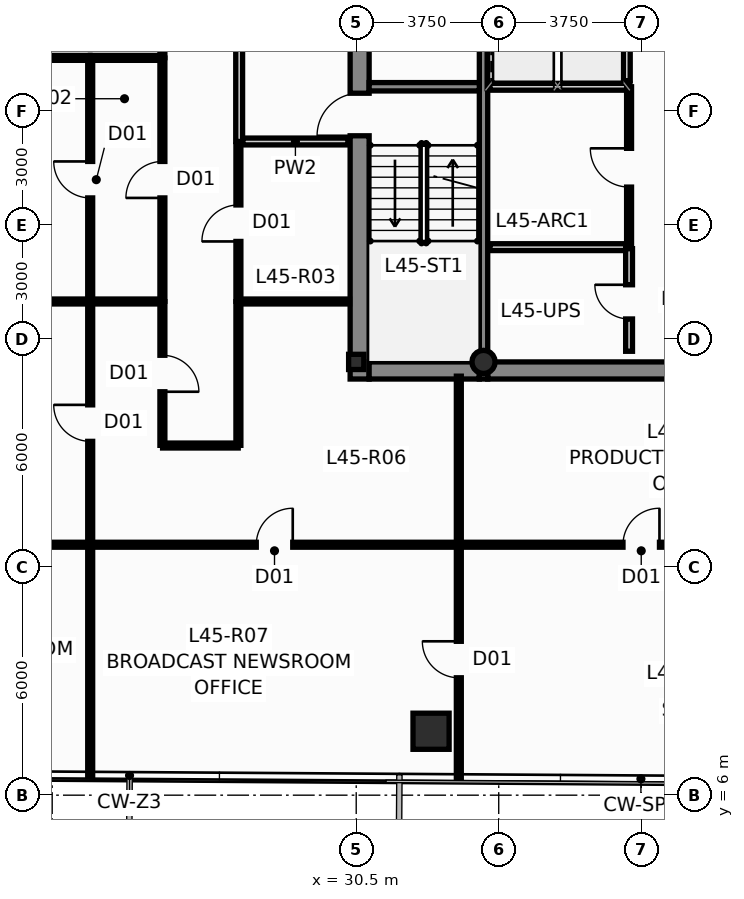
"""IFC4 building model, lengths in metres.
Left out: names, types, materials, properties, quantities, classifications, styles, units other than length and angle.
Written with IfcOpenShell. Run it as: python <this file> out.ifc"""

import sys

from ifc_helpers import new_model, si_unit, direction, frame, frame_2d, origin, origin_2d, place, context, subcontext, project, spatial, rectangle, hollow_rectangle, hollow_circle, i_section, extrude, source, transform, mapped, element, fill, save


model = new_model("IFC4")
c1 = context("Model", 3, precision=1e-05, world=origin(), true_north=direction((0.0, 1.0)))
c2 = subcontext(c1, "Body", "Model", "MODEL_VIEW")
j1 = project(units=[si_unit("LENGTHUNIT", "METRE"), si_unit("PLANEANGLEUNIT", "RADIAN")], contexts=[c1])
p1 = place(None, origin())
s1 = spatial("IfcSite", under=j1, at=p1, CompositionType="ELEMENT")
p2 = place(p1, origin())
s2 = spatial("IfcBuilding", under=s1, at=p2, CompositionType="ELEMENT")
p3 = place(p2, frame((0.0, 0.0, 173.1)))
s3 = spatial("IfcBuildingStorey", under=s2, at=p3, CompositionType="ELEMENT", Elevation=173.1)
m1 = source(origin(), c2, "Body", "SweptSolid", [
    extrude(i_section(OverallWidth=0.4, OverallDepth=0.4, WebThickness=0.02, FlangeThickness=0.032, at=origin_2d()), origin(), (0.0, 0.0, 1.0), 3.65),
])
p4 = place(p3, frame((30.5, 17.4, 0.0), z_axis=(0.0, 0.0, 1.0), x_axis=(1.0, 0.0, 0.0)))
e1 = element("IfcColumn", 1, at=p4, inside=s3, PredefinedType="COLUMN", context=c2, shape_type="MappedRepresentation", body=[
    mapped(m1, transform((0.0, 0.0, 0.0), scale=1.0)),
])
m2 = source(origin(), c2, "Body", "SweptSolid", [
    extrude(hollow_circle(Radius=0.305, WallThickness=0.025, at=origin_2d()), origin(), (0.0, 0.0, 1.0), 3.65),
])
p5 = place(p3, frame((33.85, 17.4, 0.0), z_axis=(0.0, 0.0, 1.0), x_axis=(1.0, 0.0, 0.0)))
e2 = element("IfcColumn", 2, at=p5, inside=s3, PredefinedType="COLUMN", context=c2, shape_type="MappedRepresentation", body=[
    mapped(m2, transform((0.0, 0.0, 0.0), scale=1.0)),
])
p6 = place(p3, frame((30.59, 16.95, 0.0), z_axis=(0.0, 0.0, 1.0), x_axis=(0.0, 1.0, 0.0)))
e3 = element("IfcWall", 3, at=p6, inside=s3, PredefinedType="SHEAR", context=c2, shape_type="SweptSolid", body=[
    extrude(rectangle(XDim=13.275, YDim=0.5, at=frame_2d((6.638, 0.0))), origin(), (0.0, 0.0, 1.0), 3.65),
])
p7 = place(p6, frame((6.4, 0.0, 0.0)))
e4 = element("IfcOpeningElement", 4, at=p7, cuts=e3, PredefinedType="OPENING", context=c2, shape_type="SweptSolid", body=[
    extrude(rectangle(XDim=1.12, YDim=2.15, at=frame_2d((0.56, 1.075))), frame((0.0, 0.262, 0.0), z_axis=(0.0, -1.0, 0.0), x_axis=(1.0, 0.0, 0.0)), (0.0, 0.0, 1.0), 0.524),
])
p8 = place(p6, frame((10.85, 0.0, 0.0)))
e5 = element("IfcOpeningElement", 5, at=p8, cuts=e3, PredefinedType="OPENING", context=c2, shape_type="SweptSolid", body=[
    extrude(rectangle(XDim=1.2, YDim=2.2, at=frame_2d((0.6, 1.1))), frame((0.0, 0.262, 0.0), z_axis=(0.0, -1.0, 0.0), x_axis=(1.0, 0.0, 0.0)), (0.0, 0.0, 1.0), 0.524),
])
p9 = place(p3, frame((30.84, 17.175, 0.0), z_axis=(0.0, 0.0, 1.0), x_axis=(1.0, 0.0, 0.0)))
e6 = element("IfcWall", 6, at=p9, inside=s3, PredefinedType="SHEAR", context=c2, shape_type="SweptSolid", body=[
    extrude(rectangle(XDim=2.9, YDim=0.45, at=frame_2d((1.45, 0.0))), origin(), (0.0, 0.0, 1.0), 3.65),
])
p10 = place(p3, frame((33.96, 17.175, 0.0), z_axis=(0.0, 0.0, 1.0), x_axis=(1.0, 0.0, 0.0)))
e7 = element("IfcWall", 7, at=p10, inside=s3, PredefinedType="SHEAR", context=c2, shape_type="SweptSolid", body=[
    extrude(rectangle(XDim=8.08, YDim=0.45, at=frame_2d((4.04, 0.0))), origin(), (0.0, 0.0, 1.0), 3.65),
])
p11 = place(p3, frame((33.85, 16.95, 0.0), z_axis=(0.0, 0.0, 1.0), x_axis=(0.0, 1.0, 0.0)))
e8 = element("IfcWall", 8, at=p11, inside=s3, PredefinedType="SHEAR", context=c2, shape_type="SweptSolid", body=[
    extrude(rectangle(XDim=13.275, YDim=0.22, at=frame_2d((6.638, 0.0))), origin(), (0.0, 0.0, 1.0), 3.65),
])
p12 = place(p3, frame((30.84, 24.64, 0.0), z_axis=(0.0, 0.0, 1.0), x_axis=(1.0, 0.0, 0.0)))
e9 = element("IfcWall", 9, at=p12, inside=s3, PredefinedType="SHEAR", context=c2, shape_type="SweptSolid", body=[
    extrude(rectangle(XDim=2.9, YDim=0.22, at=frame_2d((1.45, 0.0))), origin(), (0.0, 0.0, 1.0), 3.65),
])
m3 = source(origin(), c2, "Body", "SweptSolid", [
    extrude(hollow_rectangle(XDim=0.95, YDim=0.95, WallThickness=0.05, at=origin_2d()), origin(), (0.0, 0.0, 1.0), 3.651),
])
p13 = place(p3, frame((32.469, 7.682, 0.0), z_axis=(-0.004480676264, 0.019862102244, 0.999792688728), x_axis=(-0.975486508487, -0.220059246022, 0.0)))
e10 = element("IfcColumn", 10, at=p13, inside=s3, PredefinedType="COLUMN", context=c2, shape_type="MappedRepresentation", body=[
    mapped(m3, transform((0.0, 0.0, 0.0), scale=1.0)),
])
p14 = place(p3, frame((37.62, 24.8, 0.0), z_axis=(0.0, 0.0, 1.0), x_axis=(0.0, 1.0, 0.0)))
e11 = element("IfcWall", 11, at=p14, inside=s3, PredefinedType="PARTITIONING", context=c2, shape_type="SweptSolid", body=[
    extrude(rectangle(XDim=2.0, YDim=0.18, at=frame_2d((1.0, 0.0))), origin(), (0.0, 0.0, 1.0), 3.4),
])
p15 = place(p3, frame((34.02, 24.64, 0.0), z_axis=(0.0, 0.0, 1.0), x_axis=(1.0, 0.0, 0.0)))
e12 = element("IfcWall", 12, at=p15, inside=s3, PredefinedType="PARTITIONING", context=c2, shape_type="SweptSolid", body=[
    extrude(rectangle(XDim=3.68, YDim=0.18, at=frame_2d((1.84, 0.0))), origin(), (0.0, 0.0, 1.0), 3.4),
])
p16 = place(p3, frame((27.42, 23.2, 0.0), z_axis=(0.0, 0.0, 1.0), x_axis=(0.0, 1.0, 0.0)))
e13 = element("IfcWall", 13, at=p16, inside=s3, PredefinedType="PARTITIONING", context=c2, shape_type="SweptSolid", body=[
    extrude(rectangle(XDim=6.4, YDim=0.18, at=frame_2d((3.2, 0.0))), origin(), (0.0, 0.0, 1.0), 3.078),
])
p17 = place(p16, frame((2.65, 0.0, 0.0)))
e14 = element("IfcOpeningElement", 14, at=p17, cuts=e13, PredefinedType="OPENING", context=c2, shape_type="SweptSolid", body=[
    extrude(rectangle(XDim=1.05, YDim=2.15, at=frame_2d((0.525, 1.075))), frame((0.0, 0.102, 0.0), z_axis=(0.0, -1.0, 0.0), x_axis=(1.0, 0.0, 0.0)), (0.0, 0.0, 1.0), 0.204),
])
p18 = place(p3, frame((27.52, 23.2, 0.0), z_axis=(0.0, 0.0, 1.0), x_axis=(1.0, 0.0, 0.0)))
e15 = element("IfcWall", 15, at=p18, inside=s3, PredefinedType="PARTITIONING", context=c2, shape_type="SweptSolid", body=[
    extrude(rectangle(XDim=2.76, YDim=0.18, at=frame_2d((1.38, 0.0))), origin(), (0.0, 0.0, 1.0), 3.4),
])
p19 = place(p3, frame((34.02, 20.42, 0.0), z_axis=(0.0, 0.0, 1.0), x_axis=(1.0, 0.0, 0.0)))
e16 = element("IfcWall", 16, at=p19, inside=s3, PredefinedType="PARTITIONING", context=c2, shape_type="SweptSolid", body=[
    extrude(rectangle(XDim=3.64, YDim=0.18, at=frame_2d((1.82, 0.0))), origin(), (0.0, 0.0, 1.0), 3.4),
])
p20 = place(p3, frame((37.68, 20.5, 0.0), z_axis=(0.0, 0.0, 1.0), x_axis=(0.0, 1.0, 0.0)))
e17 = element("IfcWall", 17, at=p20, inside=s3, PredefinedType="PARTITIONING", context=c2, shape_type="SweptSolid", body=[
    extrude(rectangle(XDim=4.14, YDim=0.13, at=frame_2d((2.07, 0.0))), origin(), (0.0, 0.0, 1.0), 3.4),
])
p21 = place(p20, frame((1.5, 0.0, 0.0)))
e18 = element("IfcOpeningElement", 18, at=p21, cuts=e17, PredefinedType="OPENING", context=c2, shape_type="SweptSolid", body=[
    extrude(rectangle(XDim=1.02, YDim=2.15, at=frame_2d((0.51, 1.075))), frame((0.0, 0.077, 0.0), z_axis=(0.0, -1.0, 0.0), x_axis=(1.0, 0.0, 0.0)), (0.0, 0.0, 1.0), 0.154),
])
p22 = place(p3, frame((37.68, 17.68, 0.0), z_axis=(0.0, 0.0, 1.0), x_axis=(0.0, 1.0, 0.0)))
e19 = element("IfcWall", 19, at=p22, inside=s3, PredefinedType="PARTITIONING", context=c2, shape_type="SweptSolid", body=[
    extrude(rectangle(XDim=2.7, YDim=0.18, at=frame_2d((1.35, 0.0))), origin(), (0.0, 0.0, 1.0), 3.4),
])
p23 = place(p22, frame((0.85, 0.0, 0.0)))
e20 = element("IfcOpeningElement", 20, at=p23, cuts=e19, PredefinedType="OPENING", context=c2, shape_type="SweptSolid", body=[
    extrude(rectangle(XDim=0.9, YDim=2.1, at=frame_2d((0.45, 1.05))), frame((0.0, 0.102, 0.0), z_axis=(0.0, -1.0, 0.0), x_axis=(1.0, 0.0, 0.0)), (0.0, 0.0, 1.0), 0.204),
])
p24 = place(p3, frame((13.827, 12.59, 0.0), z_axis=(0.0, 0.0, 1.0), x_axis=(1.0, 0.0, 0.0)))
e21 = element("IfcWall", 21, at=p24, inside=s3, PredefinedType="PARTITIONING", context=c2, shape_type="SweptSolid", body=[
    extrude(rectangle(XDim=9.668, YDim=0.13, at=frame_2d((4.834, 0.0))), origin(), (0.0, 0.0, 1.0), 3.4),
])
p25 = place(p24, frame((4.408, 0.0, 0.0)))
e22 = element("IfcOpeningElement", 22, at=p25, cuts=e21, PredefinedType="OPENING", context=c2, shape_type="SweptSolid", body=[
    extrude(rectangle(XDim=0.96, YDim=2.15, at=frame_2d((0.48, 1.075))), frame((0.0, 0.077, 0.0), z_axis=(0.0, -1.0, 0.0), x_axis=(1.0, 0.0, 0.0)), (0.0, 0.0, 1.0), 0.154),
])
p26 = place(p3, frame((23.505, 12.59, 0.0), z_axis=(0.0, 0.0, 1.0), x_axis=(1.0, 0.0, 0.0)))
e23 = element("IfcWall", 23, at=p26, inside=s3, PredefinedType="PARTITIONING", context=c2, shape_type="SweptSolid", body=[
    extrude(rectangle(XDim=9.69, YDim=0.13, at=frame_2d((4.845, 0.0))), origin(), (0.0, 0.0, 1.0), 3.4),
])
p27 = place(p26, frame((4.365, 0.0, 0.0)))
e24 = element("IfcOpeningElement", 24, at=p27, cuts=e23, PredefinedType="OPENING", context=c2, shape_type="SweptSolid", body=[
    extrude(rectangle(XDim=0.96, YDim=2.15, at=frame_2d((0.48, 1.075))), frame((0.0, 0.077, 0.0), z_axis=(0.0, -1.0, 0.0), x_axis=(1.0, 0.0, 0.0)), (0.0, 0.0, 1.0), 0.154),
])
p28 = place(p3, frame((33.205, 12.59, 0.0), z_axis=(0.0, 0.0, 1.0), x_axis=(1.0, 0.0, 0.0)))
e25 = element("IfcWall", 25, at=p28, inside=s3, PredefinedType="PARTITIONING", context=c2, shape_type="SweptSolid", body=[
    extrude(rectangle(XDim=9.59, YDim=0.13, at=frame_2d((4.795, 0.0))), origin(), (0.0, 0.0, 1.0), 3.4),
])
p29 = place(p28, frame((4.315, 0.0, 0.0)))
e26 = element("IfcOpeningElement", 26, at=p29, cuts=e25, PredefinedType="OPENING", context=c2, shape_type="SweptSolid", body=[
    extrude(rectangle(XDim=0.96, YDim=2.15, at=frame_2d((0.48, 1.075))), frame((0.0, 0.077, 0.0), z_axis=(0.0, -1.0, 0.0), x_axis=(1.0, 0.0, 0.0)), (0.0, 0.0, 1.0), 0.154),
])
p30 = place(p3, frame((15.201, 18.99, 0.0), z_axis=(0.0, 0.0, 1.0), x_axis=(1.0, 0.0, 0.0)))
e27 = element("IfcWall", 27, at=p30, inside=s3, PredefinedType="PARTITIONING", context=c2, shape_type="SweptSolid", body=[
    extrude(rectangle(XDim=8.294, YDim=0.13, at=frame_2d((4.147, 0.0))), origin(), (0.0, 0.0, 1.0), 3.4),
])
p31 = place(p3, frame((25.4, 18.995, 0.0), z_axis=(0.0, 0.0, 1.0), x_axis=(0.0, 1.0, 0.0)))
e28 = element("IfcWall", 28, at=p31, inside=s3, PredefinedType="PARTITIONING", context=c2, shape_type="SweptSolid", body=[
    extrude(rectangle(XDim=6.4, YDim=0.13, at=frame_2d((3.2, 0.0))), origin(), (0.0, 0.0, 1.0), 3.078),
])
p32 = place(p31, frame((2.72, 0.0, 0.0)))
e29 = element("IfcOpeningElement", 29, at=p32, cuts=e28, PredefinedType="OPENING", context=c2, shape_type="SweptSolid", body=[
    extrude(rectangle(XDim=0.96, YDim=2.15, at=frame_2d((0.48, 1.075))), frame((0.0, 0.077, 0.0), z_axis=(0.0, -1.0, 0.0), x_axis=(1.0, 0.0, 0.0)), (0.0, 0.0, 1.0), 0.154),
])
p33 = place(p3, frame((23.5, 18.995, 0.0), z_axis=(0.0, 0.0, 1.0), x_axis=(0.0, 1.0, 0.0)))
e30 = element("IfcWall", 30, at=p33, inside=s3, PredefinedType="PARTITIONING", context=c2, shape_type="SweptSolid", body=[
    extrude(rectangle(XDim=6.4, YDim=0.13, at=frame_2d((3.2, 0.0))), origin(), (0.0, 0.0, 1.0), 3.078),
])
p34 = place(p33, frame((2.72, 0.0, 0.0)))
e31 = element("IfcOpeningElement", 31, at=p34, cuts=e30, PredefinedType="OPENING", context=c2, shape_type="SweptSolid", body=[
    extrude(rectangle(XDim=0.96, YDim=2.15, at=frame_2d((0.48, 1.075))), frame((0.0, 0.077, 0.0), z_axis=(0.0, -1.0, 0.0), x_axis=(1.0, 0.0, 0.0)), (0.0, 0.0, 1.0), 0.154),
])
p35 = place(p3, frame((23.5, 12.595, 0.0), z_axis=(0.0, 0.0, 1.0), x_axis=(0.0, 1.0, 0.0)))
e32 = element("IfcWall", 32, at=p35, inside=s3, PredefinedType="PARTITIONING", context=c2, shape_type="SweptSolid", body=[
    extrude(rectangle(XDim=6.39, YDim=0.13, at=frame_2d((3.195, 0.0))), origin(), (0.0, 0.0, 1.0), 3.4),
])
p36 = place(p35, frame((2.715, 0.0, 0.0)))
e33 = element("IfcOpeningElement", 33, at=p36, cuts=e32, PredefinedType="OPENING", context=c2, shape_type="SweptSolid", body=[
    extrude(rectangle(XDim=0.96, YDim=2.15, at=frame_2d((0.48, 1.075))), frame((0.0, 0.077, 0.0), z_axis=(0.0, -1.0, 0.0), x_axis=(1.0, 0.0, 0.0)), (0.0, 0.0, 1.0), 0.154),
])
p37 = place(p3, frame((33.2, 6.456, 0.0), z_axis=(0.0, 0.0, 1.0), x_axis=(0.0, 1.0, 0.0)))
e34 = element("IfcWall", 34, at=p37, inside=s3, PredefinedType="PARTITIONING", context=c2, shape_type="SweptSolid", body=[
    extrude(rectangle(XDim=6.129, YDim=0.13, at=frame_2d((3.064, 0.0))), origin(), (0.0, 0.0, 1.0), 3.4),
])
p38 = place(p37, frame((2.633, 0.0, 0.0)))
e35 = element("IfcOpeningElement", 35, at=p38, cuts=e34, PredefinedType="OPENING", context=c2, shape_type="SweptSolid", body=[
    extrude(rectangle(XDim=0.96, YDim=2.15, at=frame_2d((0.48, 1.075))), frame((0.0, 0.077, 0.0), z_axis=(0.0, -1.0, 0.0), x_axis=(1.0, 0.0, 0.0)), (0.0, 0.0, 1.0), 0.154),
])
p39 = place(p3, frame((23.5, 6.52, 0.0), z_axis=(0.0, 0.0, 1.0), x_axis=(0.0, 1.0, 0.0)))
e36 = element("IfcWall", 36, at=p39, inside=s3, PredefinedType="PARTITIONING", context=c2, shape_type="SweptSolid", body=[
    extrude(rectangle(XDim=6.065, YDim=0.13, at=frame_2d((3.032, 0.0))), origin(), (0.0, 0.0, 1.0), 3.4),
])
p40 = place(p3, frame((25.4, 30.095, 0.0), z_axis=(0.0, 0.0, 1.0), x_axis=(0.0, -1.0, 0.0)))
e37 = element("IfcWall", 37, at=p40, inside=s3, PredefinedType="PARTITIONING", context=c2, shape_type="SweptSolid", body=[
    extrude(rectangle(XDim=4.69, YDim=0.13, at=frame_2d((2.345, 0.0))), origin(), (0.0, 0.0, 1.0), 3.078),
])
p41 = place(p40, frame((1.865, 0.0, 0.0)))
e38 = element("IfcOpeningElement", 38, at=p41, cuts=e37, PredefinedType="OPENING", context=c2, shape_type="SweptSolid", body=[
    extrude(rectangle(XDim=0.96, YDim=2.15, at=frame_2d((0.48, 1.075))), frame((0.0, 0.077, 0.0), z_axis=(0.0, -1.0, 0.0), x_axis=(1.0, 0.0, 0.0)), (0.0, 0.0, 1.0), 0.154),
])
p42 = place(p3, frame((18.982, 25.4, 0.0), z_axis=(0.0, 0.0, 1.0), x_axis=(1.0, 0.0, 0.0)))
e39 = element("IfcWall", 39, at=p42, inside=s3, PredefinedType="PARTITIONING", context=c2, shape_type="SweptSolid", body=[
    extrude(rectangle(XDim=4.513, YDim=0.13, at=frame_2d((2.257, 0.0))), origin(), (0.0, 0.0, 1.0), 3.4),
])
p43 = place(p3, frame((33.2, 12.595, 0.0), z_axis=(0.0, 0.0, 1.0), x_axis=(0.0, 1.0, 0.0)))
e40 = element("IfcWall", 40, at=p43, inside=s3, PredefinedType="PARTITIONING", context=c2, shape_type="SweptSolid", body=[
    extrude(rectangle(XDim=4.43, YDim=0.13, at=frame_2d((2.215, 0.0))), origin(), (0.0, 0.0, 1.0), 3.4),
])
p44 = place(p3, frame((27.4, 18.995, 0.0), z_axis=(0.0, 0.0, 1.0), x_axis=(0.0, 1.0, 0.0)))
e41 = element("IfcWall", 41, at=p44, inside=s3, PredefinedType="PARTITIONING", context=c2, shape_type="SweptSolid", body=[
    extrude(rectangle(XDim=4.11, YDim=0.13, at=frame_2d((2.055, 0.0))), origin(), (0.0, 0.0, 1.0), 3.078),
])
p45 = place(p44, frame((1.575, 0.0, 0.0)))
e42 = element("IfcOpeningElement", 42, at=p45, cuts=e41, PredefinedType="OPENING", context=c2, shape_type="SweptSolid", body=[
    extrude(rectangle(XDim=0.96, YDim=2.15, at=frame_2d((0.48, 1.075))), frame((0.0, 0.077, 0.0), z_axis=(0.0, -1.0, 0.0), x_axis=(1.0, 0.0, 0.0)), (0.0, 0.0, 1.0), 0.154),
])
p46 = place(p3, frame((25.4, 18.985, 0.0), z_axis=(0.0, 0.0, 1.0), x_axis=(0.0, -1.0, 0.0)))
e43 = element("IfcWall", 43, at=p46, inside=s3, PredefinedType="PARTITIONING", context=c2, shape_type="SweptSolid", body=[
    extrude(rectangle(XDim=3.78, YDim=0.13, at=frame_2d((1.89, 0.0))), origin(), (0.0, 0.0, 1.0), 3.4),
])
p47 = place(p46, frame((1.41, 0.0, 0.0)))
e44 = element("IfcOpeningElement", 44, at=p47, cuts=e43, PredefinedType="OPENING", context=c2, shape_type="SweptSolid", body=[
    extrude(rectangle(XDim=0.96, YDim=2.15, at=frame_2d((0.48, 1.075))), frame((0.0, 0.077, 0.0), z_axis=(0.0, -1.0, 0.0), x_axis=(1.0, 0.0, 0.0)), (0.0, 0.0, 1.0), 0.154),
])
p48 = place(p3, frame((27.4, 15.205, 0.0), z_axis=(0.0, 0.0, 1.0), x_axis=(0.0, 1.0, 0.0)))
e45 = element("IfcWall", 45, at=p48, inside=s3, PredefinedType="PARTITIONING", context=c2, shape_type="SweptSolid", body=[
    extrude(rectangle(XDim=3.78, YDim=0.13, at=frame_2d((1.89, 0.0))), origin(), (0.0, 0.0, 1.0), 3.4),
])
p49 = place(p3, frame((27.405, 18.99, 0.0), z_axis=(0.0, 0.0, 1.0), x_axis=(1.0, 0.0, 0.0)))
e46 = element("IfcWall", 46, at=p49, inside=s3, PredefinedType="PARTITIONING", context=c2, shape_type="SweptSolid", body=[
    extrude(rectangle(XDim=2.92, YDim=0.13, at=frame_2d((1.46, 0.0))), origin(), (0.0, 0.0, 1.0), 3.4),
])
p50 = place(p3, frame((25.405, 15.2, 0.0), z_axis=(0.0, 0.0, 1.0), x_axis=(1.0, 0.0, 0.0)))
e47 = element("IfcWall", 47, at=p50, inside=s3, PredefinedType="PARTITIONING", context=c2, shape_type="SweptSolid", body=[
    extrude(rectangle(XDim=1.99, YDim=0.13, at=frame_2d((0.995, 0.0))), origin(), (0.0, 0.0, 1.0), 3.4),
])
for number, where, z_axis, x_axis in (
    (48, (23.505, 18.99, 0.0), (0.0, 0.0, 1.0), (1.0, 0.0, 0.0)),
    (49, (23.505, 25.4, 0.0), (0.0, 0.0, 1.0), (1.0, 0.0, 0.0)),
):
    element("IfcWall", number, at=place(p3, frame(where, z_axis=z_axis, x_axis=x_axis)), inside=s3, PredefinedType="PARTITIONING", context=c2, shape_type="SweptSolid", body=[
        extrude(rectangle(XDim=1.89, YDim=0.13, at=frame_2d((0.945, 0.0))), origin(), (0.0, 0.0, 1.0), 3.4),
    ])
p51 = place(p7, origin())
e50 = element("IfcDoor", 50, at=p51, inside=s3, OperationType="SINGLE_SWING_LEFT", PredefinedType="DOOR", context=c2, shape_type="SweptSolid", body=[
    extrude(rectangle(XDim=1.12, YDim=2.15, at=frame_2d((0.56, 1.075))), frame((0.0, 0.025, 0.0), z_axis=(0.0, -1.0, 0.0), x_axis=(1.0, 0.0, 0.0)), (0.0, 0.0, 1.0), 0.05),
])
fill(e4, e50)
p52 = place(p21, origin())
e51 = element("IfcDoor", 51, at=p52, inside=s3, OperationType="SINGLE_SWING_RIGHT", PredefinedType="DOOR", context=c2, shape_type="SweptSolid", body=[
    extrude(rectangle(XDim=1.02, YDim=2.15, at=frame_2d((0.51, 1.075))), frame((0.0, 0.025, 0.0), z_axis=(0.0, -1.0, 0.0), x_axis=(1.0, 0.0, 0.0)), (0.0, 0.0, 1.0), 0.05),
])
fill(e18, e51)
p53 = place(p23, origin())
e52 = element("IfcDoor", 52, at=p53, inside=s3, OperationType="SINGLE_SWING_RIGHT", PredefinedType="DOOR", context=c2, shape_type="SweptSolid", body=[
    extrude(rectangle(XDim=0.9, YDim=2.1, at=frame_2d((0.45, 1.05))), frame((0.0, 0.025, 0.0), z_axis=(0.0, -1.0, 0.0), x_axis=(1.0, 0.0, 0.0)), (0.0, 0.0, 1.0), 0.05),
])
fill(e20, e52)
p54 = place(p27, origin())
e53 = element("IfcDoor", 53, at=p54, inside=s3, OperationType="SINGLE_SWING_RIGHT", PredefinedType="DOOR", context=c2, shape_type="SweptSolid", body=[
    extrude(rectangle(XDim=0.96, YDim=2.15, at=frame_2d((0.48, 1.075))), frame((0.0, 0.025, 0.0), z_axis=(0.0, -1.0, 0.0), x_axis=(1.0, 0.0, 0.0)), (0.0, 0.0, 1.0), 0.05),
])
fill(e24, e53)
p55 = place(p29, origin())
e54 = element("IfcDoor", 54, at=p55, inside=s3, OperationType="SINGLE_SWING_RIGHT", PredefinedType="DOOR", context=c2, shape_type="SweptSolid", body=[
    extrude(rectangle(XDim=0.96, YDim=2.15, at=frame_2d((0.48, 1.075))), frame((0.0, 0.025, 0.0), z_axis=(0.0, -1.0, 0.0), x_axis=(1.0, 0.0, 0.0)), (0.0, 0.0, 1.0), 0.05),
])
fill(e26, e54)
p56 = place(p32, origin())
e55 = element("IfcDoor", 55, at=p56, inside=s3, OperationType="SINGLE_SWING_LEFT", PredefinedType="DOOR", context=c2, shape_type="SweptSolid", body=[
    extrude(rectangle(XDim=0.96, YDim=2.15, at=frame_2d((0.48, 1.075))), frame((0.0, 0.025, 0.0), z_axis=(0.0, -1.0, 0.0), x_axis=(1.0, 0.0, 0.0)), (0.0, 0.0, 1.0), 0.05),
])
fill(e29, e55)
p57 = place(p34, origin())
e56 = element("IfcDoor", 56, at=p57, inside=s3, OperationType="SINGLE_SWING_RIGHT", PredefinedType="DOOR", context=c2, shape_type="SweptSolid", body=[
    extrude(rectangle(XDim=0.96, YDim=2.15, at=frame_2d((0.48, 1.075))), frame((0.0, 0.025, 0.0), z_axis=(0.0, -1.0, 0.0), x_axis=(1.0, 0.0, 0.0)), (0.0, 0.0, 1.0), 0.05),
])
fill(e31, e56)
p58 = place(p36, origin())
e57 = element("IfcDoor", 57, at=p58, inside=s3, OperationType="SINGLE_SWING_RIGHT", PredefinedType="DOOR", context=c2, shape_type="SweptSolid", body=[
    extrude(rectangle(XDim=0.96, YDim=2.15, at=frame_2d((0.48, 1.075))), frame((0.0, 0.025, 0.0), z_axis=(0.0, -1.0, 0.0), x_axis=(1.0, 0.0, 0.0)), (0.0, 0.0, 1.0), 0.05),
])
fill(e33, e57)
p59 = place(p38, origin())
e58 = element("IfcDoor", 58, at=p59, inside=s3, OperationType="SINGLE_SWING_RIGHT", PredefinedType="DOOR", context=c2, shape_type="SweptSolid", body=[
    extrude(rectangle(XDim=0.96, YDim=2.15, at=frame_2d((0.48, 1.075))), frame((0.0, 0.025, 0.0), z_axis=(0.0, -1.0, 0.0), x_axis=(1.0, 0.0, 0.0)), (0.0, 0.0, 1.0), 0.05),
])
fill(e35, e58)
p60 = place(p45, origin())
e59 = element("IfcDoor", 59, at=p60, inside=s3, OperationType="SINGLE_SWING_LEFT", PredefinedType="DOOR", context=c2, shape_type="SweptSolid", body=[
    extrude(rectangle(XDim=0.96, YDim=2.15, at=frame_2d((0.48, 1.075))), frame((0.0, 0.025, 0.0), z_axis=(0.0, -1.0, 0.0), x_axis=(1.0, 0.0, 0.0)), (0.0, 0.0, 1.0), 0.05),
])
fill(e42, e59)
p61 = place(p47, origin())
e60 = element("IfcDoor", 60, at=p61, inside=s3, OperationType="SINGLE_SWING_RIGHT", PredefinedType="DOOR", context=c2, shape_type="SweptSolid", body=[
    extrude(rectangle(XDim=0.96, YDim=2.15, at=frame_2d((0.48, 1.075))), frame((0.0, 0.025, 0.0), z_axis=(0.0, -1.0, 0.0), x_axis=(1.0, 0.0, 0.0)), (0.0, 0.0, 1.0), 0.05),
])
fill(e44, e60)
save(model, sys.argv[1])
